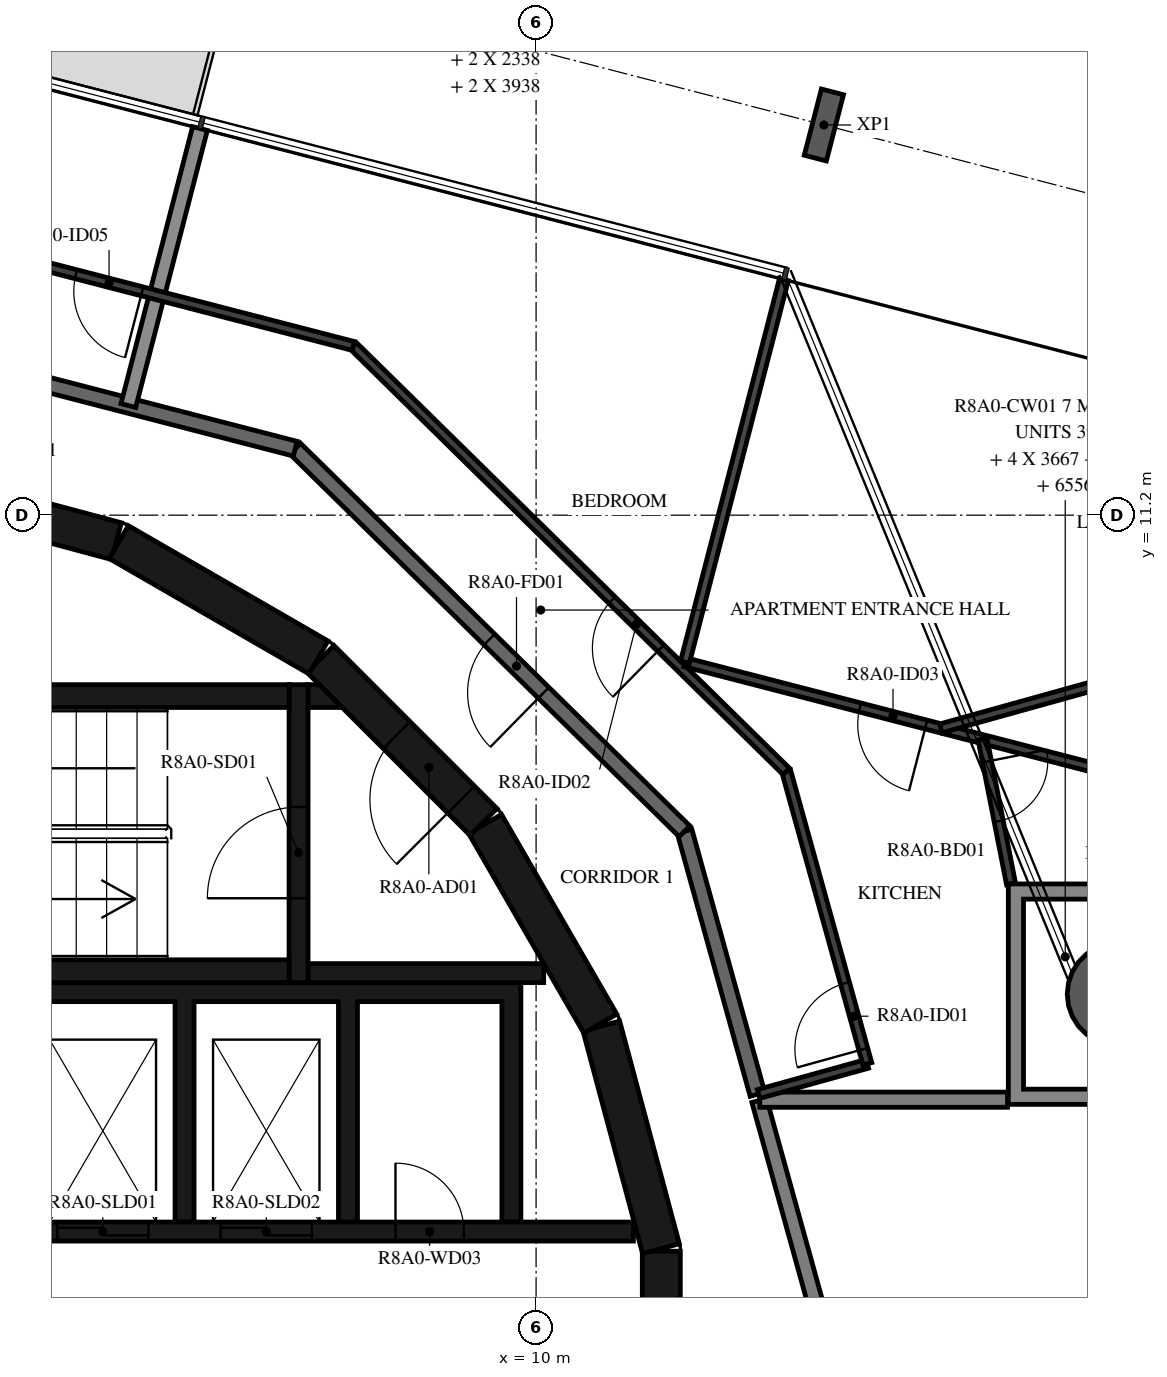
"""IFC4 building model, lengths in metres.
Left out: names, types, materials, properties, quantities, classifications, styles, units other than length and angle.
Written with IfcOpenShell. Run it as: python <this file> out.ifc"""

import sys

from ifc_helpers import new_model, si_unit, direction, frame, frame_2d, origin, origin_2d, place, context, subcontext, project, spatial, polyline, rectangle, hollow_circle, i_section, outline, extrude, element, fill, save


model = new_model("IFC4")
c1 = context("Model", 3, precision=1e-05, world=origin(), true_north=direction((0.0, 1.0)))
c2 = subcontext(c1, "Body", "Model", "MODEL_VIEW")
j1 = project(units=[si_unit("LENGTHUNIT", "METRE"), si_unit("PLANEANGLEUNIT", "RADIAN")], contexts=[c1])
p1 = place(None, origin())
s1 = spatial("IfcSite", under=j1, at=p1, CompositionType="ELEMENT")
p2 = place(p1, origin())
s2 = spatial("IfcBuilding", under=s1, at=p2, CompositionType="ELEMENT")
p3 = place(p2, frame((0.0, 0.0, 305.2)))
s3 = spatial("IfcBuildingStorey", under=s2, at=p3, CompositionType="ELEMENT", Elevation=305.2)
p4 = place(p3, frame((17.663, 4.898, -0.38), z_axis=(0.0, 0.0, 1.0), x_axis=(1.0, 0.0, 0.0)))
e1 = element("IfcColumn", 1, at=p4, inside=s3, PredefinedType="COLUMN", context=c2, shape_type="SweptSolid", body=[
    extrude(hollow_circle(Radius=0.675, WallThickness=0.03, at=origin_2d()), origin(), (0.0, 0.0, 1.0), 3.5),
])
p5 = place(p3, frame((13.786, 16.333, -0.38), z_axis=(0.0, 0.0, 1.0), x_axis=(0.968147663906, -0.250379913079, 0.0)))
e2 = element("IfcColumn", 2, at=p5, inside=s3, PredefinedType="COLUMN", context=c2, shape_type="SweptSolid", body=[
    extrude(i_section(OverallWidth=0.3, OverallDepth=0.9, WebThickness=0.019, FlangeThickness=0.035, FilletRadius=0.03, at=origin_2d()), origin(), (0.0, 0.0, 1.0), 3.5),
])
p6 = place(p3, frame((11.647, -1.516, 0.0), z_axis=(0.0, 0.0, 1.0), x_axis=(0.0, 1.0, 0.0)))
e3 = element("IfcWall", 3, at=p6, inside=s3, PredefinedType="SHEAR", context=c2, shape_type="SweptSolid", body=[
    extrude(rectangle(XDim=3.033, YDim=0.5, at=frame_2d((1.516, 0.0))), origin(), (0.0, 0.0, 1.0), 3.12),
])
p7 = place(p6, frame((0.616, 0.0, 0.0)))
e4 = element("IfcOpeningElement", 4, at=p7, cuts=e3, PredefinedType="OPENING", context=c2, shape_type="SweptSolid", body=[
    extrude(rectangle(XDim=1.8, YDim=2.1, at=frame_2d((0.9, 1.05))), frame((0.0, 0.26, 0.0), z_axis=(0.0, -1.0, 0.0), x_axis=(1.0, 0.0, 0.0)), (0.0, 0.0, 1.0), 0.52),
])
for number, where, z_axis, x_axis in (
    (5, (11.643, 1.55, 0.0), (0.0, 0.0, 1.0), (-0.259, 0.966, 0.0)),
    (6, (10.845, 4.51, 0.0), (0.0, 0.0, 1.0), (-0.5, 0.866, 0.0)),
):
    element("IfcWall", number, at=place(p3, frame(where, z_axis=z_axis, x_axis=x_axis)), inside=s3, PredefinedType="SHEAR", context=c2, shape_type="SweptSolid", body=[
        extrude(rectangle(XDim=3.033, YDim=0.5, at=frame_2d((1.516, 0.0))), origin(), (0.0, 0.0, 1.0), 3.12),
    ])
p8 = place(p3, frame((9.308, 7.164, 0.0), z_axis=(0.0, 0.0, 1.0), x_axis=(-0.707106781187, 0.707106781187, 0.0)))
e7 = element("IfcWall", 7, at=p8, inside=s3, PredefinedType="SHEAR", context=c2, shape_type="SweptSolid", body=[
    extrude(rectangle(XDim=3.032, YDim=0.5, at=frame_2d((1.516, 0.0))), origin(), (0.0, 0.0, 1.0), 3.12),
])
p9 = place(p8, frame((0.416, 0.0, 0.0)))
e8 = element("IfcOpeningElement", 8, at=p9, cuts=e7, PredefinedType="OPENING", context=c2, shape_type="SweptSolid", body=[
    extrude(rectangle(XDim=1.2, YDim=2.1, at=frame_2d((0.6, 1.05))), frame((0.0, 0.26, 0.0), z_axis=(0.0, -1.0, 0.0), x_axis=(1.0, 0.0, 0.0)), (0.0, 0.0, 1.0), 0.52),
])
p10 = place(p3, frame((7.137, 9.329, 0.0), z_axis=(0.0, 0.0, 1.0), x_axis=(-0.865975092491, 0.500087131594, 0.0)))
e9 = element("IfcWall", 9, at=p10, inside=s3, PredefinedType="SHEAR", context=c2, shape_type="SweptSolid", body=[
    extrude(rectangle(XDim=3.033, YDim=0.5, at=frame_2d((1.516, 0.0))), origin(), (0.0, 0.0, 1.0), 3.12),
])
p11 = place(p3, frame((4.479, 10.858, 0.0), z_axis=(0.0, 0.0, 1.0), x_axis=(-0.965948410781, 0.258734743916, 0.0)))
e10 = element("IfcWall", 10, at=p11, inside=s3, PredefinedType="SHEAR", context=c2, shape_type="SweptSolid", body=[
    extrude(rectangle(XDim=3.033, YDim=0.5, at=frame_2d((1.516, 0.0))), origin(), (0.0, 0.0, 1.0), 3.12),
])
p12 = place(p11, frame((1.066, 0.0, 0.0)))
e11 = element("IfcOpeningElement", 11, at=p12, cuts=e10, PredefinedType="OPENING", context=c2, shape_type="SweptSolid", body=[
    extrude(rectangle(XDim=0.9, YDim=2.1, at=frame_2d((0.45, 1.05))), frame((0.0, 0.26, 0.0), z_axis=(0.0, -1.0, 0.0), x_axis=(1.0, 0.0, 0.0)), (0.0, 0.0, 1.0), 0.52),
])
for number, where, z_axis, x_axis in (
    (12, (0.0, 5.2, 0.0), (0.0, 0.0, 1.0), (1.0, 0.0, 0.0)),
    (13, (0.0, 8.82, 0.0), (0.0, 0.0, 1.0), (1.0, 0.0, 0.0)),
):
    element("IfcWall", number, at=place(p3, frame(where, z_axis=z_axis, x_axis=x_axis)), inside=s3, PredefinedType="SHEAR", context=c2, shape_type="SweptSolid", body=[
        extrude(rectangle(XDim=6.75, YDim=0.3, at=frame_2d((3.375, 0.0))), origin(), (0.0, 0.0, 1.0), 3.12),
    ])
p13 = place(p3, frame((6.875, 5.05, 0.0), z_axis=(0.0, 0.0, 1.0), x_axis=(0.0, 1.0, 0.0)))
e14 = element("IfcWall", 14, at=p13, inside=s3, PredefinedType="SHEAR", context=c2, shape_type="SweptSolid", body=[
    extrude(rectangle(XDim=3.92, YDim=0.25, at=frame_2d((1.96, 0.0))), origin(), (0.0, 0.0, 1.0), 3.12),
])
p14 = place(p13, frame((1.11, 0.0, 0.0)))
e15 = element("IfcOpeningElement", 15, at=p14, cuts=e14, PredefinedType="OPENING", context=c2, shape_type="SweptSolid", body=[
    extrude(rectangle(XDim=1.2, YDim=2.1, at=frame_2d((0.6, 1.05))), frame((0.0, 0.135, 0.0), z_axis=(0.0, -1.0, 0.0), x_axis=(1.0, 0.0, 0.0)), (0.0, 0.0, 1.0), 0.27),
])
p15 = place(p3, frame((7.0, 5.175, 0.0), z_axis=(0.0, 0.0, 1.0), x_axis=(1.0, 0.0, 0.0)))
e16 = element("IfcWall", 16, at=p15, inside=s3, PredefinedType="SHEAR", context=c2, shape_type="SweptSolid", body=[
    extrude(rectangle(XDim=3.1, YDim=0.25, at=frame_2d((1.55, 0.0))), origin(), (0.0, 0.0, 1.0), 3.12),
])
p16 = place(p3, origin())
e17 = element("IfcWall", 17, at=p16, inside=s3, PredefinedType="SHEAR", context=c2, shape_type="SweptSolid", body=[
    extrude(outline(polyline([(7.448, 8.67), (7.0, 8.67), (7.0, 8.97), (7.148, 8.97), (7.448, 8.67)])), origin(), (0.0, 0.0, 1.0), 3.12),
])
p17 = place(p3, origin())
e18 = element("IfcWall", 18, at=p17, inside=s3, PredefinedType="SHEAR", context=c2, shape_type="SweptSolid", body=[
    extrude(outline(polyline([(-9.8, 1.9), (-9.55, 1.9), (-9.55, 4.8), (-1.2, 4.8), (-1.2, 1.9), (-0.95, 1.9), (-0.95, 4.8), (3.1, 4.8), (3.1, 1.9), (3.35, 1.9), (3.35, 4.8), (5.25, 4.8), (5.25, 1.9), (5.5, 1.9), (5.5, 4.8), (7.4, 4.8), (7.4, 1.9), (7.65, 1.9), (7.65, 4.8), (9.55, 4.8), (9.55, 1.9), (9.8, 1.9), (9.8, 4.8), (9.8, 5.05), (-9.8, 5.05), (-9.8, 4.8), (-9.8, 1.9)])), origin(), (0.0, 0.0, 1.0), 3.12),
])
p18 = place(p3, frame((3.35, 1.775, 0.0), z_axis=(0.0, 0.0, 1.0), x_axis=(1.0, 0.0, 0.0)))
e19 = element("IfcWall", 19, at=p18, inside=s3, PredefinedType="SHEAR", context=c2, shape_type="SweptSolid", body=[
    extrude(rectangle(XDim=7.93, YDim=0.25, at=frame_2d((3.965, 0.0))), origin(), (0.0, 0.0, 1.0), 3.12),
])
p19 = place(p18, frame((0.35, 0.0, 0.0)))
e20 = element("IfcOpeningElement", 20, at=p19, cuts=e19, PredefinedType="OPENING", context=c2, shape_type="SweptSolid", body=[
    extrude(rectangle(XDim=1.2, YDim=2.4, at=frame_2d((0.6, 1.2))), frame((0.0, 0.135, 0.0), z_axis=(0.0, -1.0, 0.0), x_axis=(1.0, 0.0, 0.0)), (0.0, 0.0, 1.0), 0.27),
])
p20 = place(p18, frame((2.5, 0.0, 0.0)))
e21 = element("IfcOpeningElement", 21, at=p20, cuts=e19, PredefinedType="OPENING", context=c2, shape_type="SweptSolid", body=[
    extrude(rectangle(XDim=1.2, YDim=2.4, at=frame_2d((0.6, 1.2))), frame((0.0, 0.135, 0.0), z_axis=(0.0, -1.0, 0.0), x_axis=(1.0, 0.0, 0.0)), (0.0, 0.0, 1.0), 0.27),
])
p21 = place(p18, frame((4.8, 0.0, 0.0)))
e22 = element("IfcOpeningElement", 22, at=p21, cuts=e19, PredefinedType="OPENING", context=c2, shape_type="SweptSolid", body=[
    extrude(rectangle(XDim=0.9, YDim=2.1, at=frame_2d((0.45, 1.05))), frame((0.0, 0.135, 0.0), z_axis=(0.0, -1.0, 0.0), x_axis=(1.0, 0.0, 0.0)), (0.0, 0.0, 1.0), 0.27),
])
p22 = place(p3, frame((13.872, 0.121, 0.0), z_axis=(0.0, 0.0, 1.0), x_axis=(-0.267291928416, 0.963615600228, 0.0)))
e23 = element("IfcWall", 23, at=p22, inside=s3, PredefinedType="STANDARD", context=c2, shape_type="SweptSolid", body=[
    extrude(rectangle(XDim=3.507, YDim=0.2, at=frame_2d((1.753, 0.0))), origin(), (0.0, 0.0, 1.0), 3.12),
])
p23 = place(p3, frame((12.913, 3.581, 0.0), z_axis=(0.0, 0.0, 1.0), x_axis=(-0.267223005422, 0.963634715737, 0.0)))
e24 = element("IfcWall", 24, at=p23, inside=s3, PredefinedType="STANDARD", context=c2, shape_type="SweptSolid", body=[
    extrude(rectangle(XDim=3.591, YDim=0.2, at=frame_2d((1.795, 0.0))), origin(), (0.0, 0.0, 1.0), 3.12),
])
p24 = place(p3, frame((11.953, 7.041, 0.0), z_axis=(0.0, 0.0, 1.0), x_axis=(-0.713250549143, 0.70090916255, 0.0)))
e25 = element("IfcWall", 25, at=p24, inside=s3, PredefinedType="STANDARD", context=c2, shape_type="SweptSolid", body=[
    extrude(rectangle(XDim=7.181, YDim=0.2, at=frame_2d((3.59, 0.0))), origin(), (0.0, 0.0, 1.0), 3.12),
])
p25 = place(p24, frame((2.6, 0.0, 0.0)))
e26 = element("IfcOpeningElement", 26, at=p25, cuts=e25, PredefinedType="OPENING", context=c2, shape_type="SweptSolid", body=[
    extrude(rectangle(XDim=1.0, YDim=2.1, at=frame_2d((0.5, 1.05))), frame((0.0, 0.11, 0.0), z_axis=(0.0, -1.0, 0.0), x_axis=(1.0, 0.0, 0.0)), (0.0, 0.0, 1.0), 0.22),
])
p26 = place(p3, frame((6.831, 12.074, 0.0), z_axis=(0.0, 0.0, 1.0), x_axis=(-0.968144780225, 0.250391063186, 0.0)))
e27 = element("IfcWall", 27, at=p26, inside=s3, PredefinedType="STANDARD", context=c2, shape_type="SweptSolid", body=[
    extrude(rectangle(XDim=7.181, YDim=0.2, at=frame_2d((3.591, 0.0))), origin(), (0.0, 0.0, 1.0), 3.12),
])
p27 = place(p3, frame((16.203, 3.51, 0.0), z_axis=(0.0, 0.0, 1.0), x_axis=(-1.0, 0.0, 0.0)))
e28 = element("IfcWall", 28, at=p27, inside=s3, PredefinedType="STANDARD", context=c2, shape_type="SweptSolid", body=[
    extrude(rectangle(XDim=3.26, YDim=0.2, at=frame_2d((1.63, 0.0))), origin(), (0.0, 0.0, 1.0), 3.12),
])
p28 = place(p3, frame((5.578, 16.287, 0.0), z_axis=(0.0, 0.0, 1.0), x_axis=(-0.250385965992, -0.968146098497, 0.0)))
e29 = element("IfcWall", 29, at=p28, inside=s3, PredefinedType="STANDARD", context=c2, shape_type="SweptSolid", body=[
    extrude(rectangle(XDim=3.765, YDim=0.2, at=frame_2d((1.882, 0.0))), origin(), (0.0, 0.0, 1.0), 2.73),
])
p29 = place(p3, frame((12.927, 3.585, 0.0), z_axis=(0.0, 0.0, 1.0), x_axis=(0.963616756608, 0.26728775951, 0.0)))
e30 = element("IfcWall", 30, at=p29, inside=s3, PredefinedType="PARTITIONING", context=c2, shape_type="SweptSolid", body=[
    extrude(rectangle(XDim=1.485, YDim=0.12, at=frame_2d((0.743, 0.0))), origin(), (0.0, 0.0, 1.0), 3.12),
])
p30 = place(p3, frame((14.358, 3.982, 0.0), z_axis=(0.0, 0.0, 1.0), x_axis=(-0.267233823916, 0.963631715623, 0.0)))
e31 = element("IfcWall", 31, at=p30, inside=s3, PredefinedType="PARTITIONING", context=c2, shape_type="SweptSolid", body=[
    extrude(rectangle(XDim=3.992, YDim=0.12, at=frame_2d((1.996, 0.0))), origin(), (0.0, 0.0, 1.0), 3.12),
])
p31 = place(p30, frame((0.2, 0.0, 0.0)))
e32 = element("IfcOpeningElement", 32, at=p31, cuts=e31, PredefinedType="OPENING", context=c2, shape_type="SweptSolid", body=[
    extrude(rectangle(XDim=0.9, YDim=2.1, at=frame_2d((0.45, 1.05))), frame((0.0, 0.07, 0.0), z_axis=(0.0, -1.0, 0.0), x_axis=(1.0, 0.0, 0.0)), (0.0, 0.0, 1.0), 0.14),
])
p32 = place(p3, frame((13.291, 7.829, 0.0), z_axis=(0.0, 0.0, 1.0), x_axis=(-0.713255978622, 0.700903637428, 0.0)))
e33 = element("IfcWall", 33, at=p32, inside=s3, PredefinedType="PARTITIONING", context=c2, shape_type="SweptSolid", body=[
    extrude(rectangle(XDim=7.985, YDim=0.12, at=frame_2d((3.992, 0.0))), origin(), (0.0, 0.0, 1.0), 3.12),
])
p33 = place(p32, frame((2.314, 0.0, 0.0)))
e34 = element("IfcOpeningElement", 34, at=p33, cuts=e33, PredefinedType="OPENING", context=c2, shape_type="SweptSolid", body=[
    extrude(rectangle(XDim=0.9, YDim=2.1, at=frame_2d((0.45, 1.05))), frame((0.0, 0.07, 0.0), z_axis=(0.0, -1.0, 0.0), x_axis=(1.0, 0.0, 0.0)), (0.0, 0.0, 1.0), 0.14),
])
p34 = place(p3, frame((7.596, 13.426, 0.0), z_axis=(0.0, 0.0, 1.0), x_axis=(-0.968146656033, 0.250383810203, 0.0)))
e35 = element("IfcWall", 35, at=p34, inside=s3, PredefinedType="PARTITIONING", context=c2, shape_type="SweptSolid", body=[
    extrude(rectangle(XDim=7.985, YDim=0.12, at=frame_2d((3.992, 0.0))), origin(), (0.0, 0.0, 1.0), 3.12),
])
p35 = place(p34, frame((2.87, 0.0, 0.0)))
e36 = element("IfcOpeningElement", 36, at=p35, cuts=e35, PredefinedType="OPENING", context=c2, shape_type="SweptSolid", body=[
    extrude(rectangle(XDim=0.9, YDim=2.1, at=frame_2d((0.45, 1.05))), frame((0.0, 0.07, 0.0), z_axis=(0.0, -1.0, 0.0), x_axis=(1.0, 0.0, 0.0)), (0.0, 0.0, 1.0), 0.14),
])
p36 = place(p3, frame((18.071, 7.685, 0.0), z_axis=(0.0, 0.0, 1.0), x_axis=(-0.968152245082, 0.250362198309, 0.0)))
e37 = element("IfcWall", 37, at=p36, inside=s3, PredefinedType="PARTITIONING", context=c2, shape_type="SweptSolid", body=[
    extrude(rectangle(XDim=6.313, YDim=0.12, at=frame_2d((3.157, 0.0))), origin(), (0.0, 0.0, 1.0), 3.12),
])
p37 = place(p36, frame((3.036, 0.0, 0.0)))
e38 = element("IfcOpeningElement", 38, at=p37, cuts=e37, PredefinedType="OPENING", context=c2, shape_type="SweptSolid", body=[
    extrude(rectangle(XDim=0.9, YDim=2.1, at=frame_2d((0.45, 1.05))), frame((0.0, 0.07, 0.0), z_axis=(0.0, -1.0, 0.0), x_axis=(1.0, 0.0, 0.0)), (0.0, 0.0, 1.0), 0.14),
])
p38 = place(p3, frame((15.873, 8.253, 0.0), z_axis=(0.0, 0.0, 1.0), x_axis=(0.19340687816, -0.981118636802, 0.0)))
e39 = element("IfcWall", 39, at=p38, inside=s3, PredefinedType="PARTITIONING", context=c2, shape_type="SweptSolid", body=[
    extrude(rectangle(XDim=1.941, YDim=0.12, at=frame_2d((0.971, 0.0))), origin(), (0.0, 0.0, 1.0), 3.12),
])
p39 = place(p38, frame((0.3, 0.0, 0.0)))
e40 = element("IfcOpeningElement", 40, at=p39, cuts=e39, PredefinedType="OPENING", context=c2, shape_type="SweptSolid", body=[
    extrude(rectangle(XDim=0.8, YDim=2.1, at=frame_2d((0.4, 1.05))), frame((0.0, 0.07, 0.0), z_axis=(0.0, -1.0, 0.0), x_axis=(1.0, 0.0, 0.0)), (0.0, 0.0, 1.0), 0.14),
])
p40 = place(p3, frame((23.225, 10.593, 0.0), z_axis=(0.0, 0.0, 1.0), x_axis=(-0.963409492722, -0.268033858559, 0.0)))
e41 = element("IfcWall", 41, at=p40, inside=s3, PredefinedType="PARTITIONING", context=c2, shape_type="SweptSolid", body=[
    extrude(rectangle(XDim=8.2, YDim=0.12, at=frame_2d((4.1, 0.0))), origin(), (0.0, 0.0, 1.0), 3.12),
])
p41 = place(p40, frame((0.5, 0.0, 0.0)))
e42 = element("IfcOpeningElement", 42, at=p41, cuts=e41, PredefinedType="OPENING", context=c2, shape_type="SweptSolid", body=[
    extrude(rectangle(XDim=0.9, YDim=2.1, at=frame_2d((0.45, 1.05))), frame((0.0, 0.07, 0.0), z_axis=(0.0, -1.0, 0.0), x_axis=(1.0, 0.0, 0.0)), (0.0, 0.0, 1.0), 0.14),
])
p42 = place(p3, frame((13.26, 14.3, 0.0), z_axis=(0.0, 0.0, 1.0), x_axis=(-0.25038206324, -0.968147107834, 0.0)))
e43 = element("IfcWall", 43, at=p42, inside=s3, PredefinedType="PARTITIONING", context=c2, shape_type="SweptSolid", body=[
    extrude(rectangle(XDim=5.2, YDim=0.12, at=frame_2d((2.6, 0.0))), origin(), (0.0, 0.0, 1.0), 2.73),
])
p43 = place(p3, origin())
e44 = element("IfcWall", 44, at=p43, inside=s3, PredefinedType="STANDARD", context=c2, shape_type="SweptSolid", body=[
    extrude(outline(polyline([(19.113, 6.348), (19.113, 3.448), (16.213, 3.448), (16.213, 6.348), (19.113, 6.348)]), holes=[polyline([(16.413, 3.648), (18.913, 3.648), (18.913, 6.148), (16.413, 6.148), (16.413, 3.648)])]), origin(), (0.0, 0.0, 1.0), 3.12),
])
p44 = place(p14, origin())
e45 = element("IfcDoor", 45, at=p44, inside=s3, OperationType="SINGLE_SWING_LEFT", PredefinedType="DOOR", context=c2, shape_type="SweptSolid", body=[
    extrude(rectangle(XDim=1.2, YDim=2.1, at=frame_2d((0.6, 1.05))), frame((0.0, 0.025, 0.0), z_axis=(0.0, -1.0, 0.0), x_axis=(1.0, 0.0, 0.0)), (0.0, 0.0, 1.0), 0.05),
])
fill(e15, e45)
p45 = place(p9, origin())
e46 = element("IfcDoor", 46, at=p45, inside=s3, OperationType="SINGLE_SWING_RIGHT", PredefinedType="DOOR", context=c2, shape_type="SweptSolid", body=[
    extrude(rectangle(XDim=1.2, YDim=2.1, at=frame_2d((0.6, 1.05))), frame((0.0, 0.025, 0.0), z_axis=(0.0, -1.0, 0.0), x_axis=(1.0, 0.0, 0.0)), (0.0, 0.0, 1.0), 0.05),
])
fill(e8, e46)
p46 = place(p19, origin())
e47 = element("IfcDoor", 47, at=p46, inside=s3, OperationType="DOUBLE_DOOR_SLIDING", PredefinedType="DOOR", context=c2, shape_type="SweptSolid", body=[
    extrude(rectangle(XDim=1.2, YDim=2.4, at=frame_2d((0.6, 1.2))), frame((0.0, 0.025, 0.0), z_axis=(0.0, -1.0, 0.0), x_axis=(1.0, 0.0, 0.0)), (0.0, 0.0, 1.0), 0.05),
])
fill(e20, e47)
p47 = place(p20, origin())
e48 = element("IfcDoor", 48, at=p47, inside=s3, OperationType="DOUBLE_DOOR_SLIDING", PredefinedType="DOOR", context=c2, shape_type="SweptSolid", body=[
    extrude(rectangle(XDim=1.2, YDim=2.4, at=frame_2d((0.6, 1.2))), frame((0.0, 0.025, 0.0), z_axis=(0.0, -1.0, 0.0), x_axis=(1.0, 0.0, 0.0)), (0.0, 0.0, 1.0), 0.05),
])
fill(e21, e48)
p48 = place(p21, origin())
e49 = element("IfcDoor", 49, at=p48, inside=s3, OperationType="SINGLE_SWING_LEFT", PredefinedType="DOOR", context=c2, shape_type="SweptSolid", body=[
    extrude(rectangle(XDim=0.9, YDim=2.1, at=frame_2d((0.45, 1.05))), frame((0.0, 0.025, 0.0), z_axis=(0.0, -1.0, 0.0), x_axis=(1.0, 0.0, 0.0)), (0.0, 0.0, 1.0), 0.05),
])
fill(e22, e49)
p49 = place(p25, origin())
e50 = element("IfcDoor", 50, at=p49, inside=s3, OperationType="SINGLE_SWING_LEFT", PredefinedType="DOOR", context=c2, shape_type="SweptSolid", body=[
    extrude(rectangle(XDim=1.0, YDim=2.1, at=frame_2d((0.5, 1.05))), frame((0.0, 0.025, 0.0), z_axis=(0.0, -1.0, 0.0), x_axis=(1.0, 0.0, 0.0)), (0.0, 0.0, 1.0), 0.05),
])
fill(e26, e50)
p50 = place(p31, origin())
e51 = element("IfcDoor", 51, at=p50, inside=s3, OperationType="SINGLE_SWING_LEFT", PredefinedType="DOOR", context=c2, shape_type="SweptSolid", body=[
    extrude(rectangle(XDim=0.9, YDim=2.1, at=frame_2d((0.45, 1.05))), frame((0.0, 0.025, 0.0), z_axis=(0.0, -1.0, 0.0), x_axis=(1.0, 0.0, 0.0)), (0.0, 0.0, 1.0), 0.05),
])
fill(e32, e51)
p51 = place(p33, origin())
e52 = element("IfcDoor", 52, at=p51, inside=s3, OperationType="SINGLE_SWING_LEFT", PredefinedType="DOOR", context=c2, shape_type="SweptSolid", body=[
    extrude(rectangle(XDim=0.9, YDim=2.1, at=frame_2d((0.45, 1.05))), frame((0.0, 0.025, 0.0), z_axis=(0.0, -1.0, 0.0), x_axis=(1.0, 0.0, 0.0)), (0.0, 0.0, 1.0), 0.05),
])
fill(e34, e52)
p52 = place(p39, origin())
e53 = element("IfcDoor", 53, at=p52, inside=s3, OperationType="SINGLE_SWING_LEFT", PredefinedType="DOOR", context=c2, shape_type="SweptSolid", body=[
    extrude(rectangle(XDim=0.8, YDim=2.1, at=frame_2d((0.4, 1.05))), frame((0.0, 0.025, 0.0), z_axis=(0.0, -1.0, 0.0), x_axis=(1.0, 0.0, 0.0)), (0.0, 0.0, 1.0), 0.05),
])
fill(e40, e53)
p53 = place(p37, origin())
e54 = element("IfcDoor", 54, at=p53, inside=s3, OperationType="SINGLE_SWING_LEFT", PredefinedType="DOOR", context=c2, shape_type="SweptSolid", body=[
    extrude(rectangle(XDim=0.9, YDim=2.1, at=frame_2d((0.45, 1.05))), frame((0.0, 0.025, 0.0), z_axis=(0.0, -1.0, 0.0), x_axis=(1.0, 0.0, 0.0)), (0.0, 0.0, 1.0), 0.05),
])
fill(e38, e54)
p54 = place(p35, origin())
e55 = element("IfcDoor", 55, at=p54, inside=s3, OperationType="SINGLE_SWING_LEFT", PredefinedType="DOOR", context=c2, shape_type="SweptSolid", body=[
    extrude(rectangle(XDim=0.9, YDim=2.1, at=frame_2d((0.45, 1.05))), frame((0.0, 0.025, 0.0), z_axis=(0.0, -1.0, 0.0), x_axis=(1.0, 0.0, 0.0)), (0.0, 0.0, 1.0), 0.05),
])
fill(e36, e55)
save(model, sys.argv[1])
